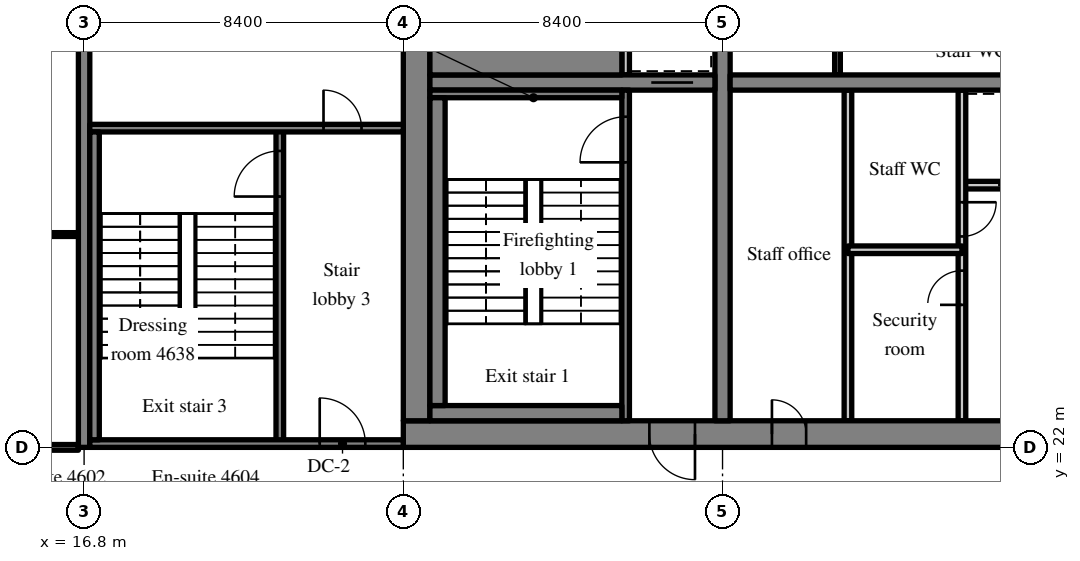
"""IFC4 building model, lengths in metres.
Left out: names, types, materials, properties, quantities, classifications, styles, units other than length and angle.
Written with IfcOpenShell. Run it as: python <this file> out.ifc"""

import sys

from ifc_helpers import new_model, si_unit, direction, frame, frame_2d, origin, place, context, subcontext, project, spatial, rectangle, extrude, source, transform, mapped, element, fill, save


model = new_model("IFC4")
c1 = context("Model", 3, precision=1e-05, world=origin(), true_north=direction((0.0, 1.0)))
c2 = subcontext(c1, "Body", "Model", "MODEL_VIEW")
j1 = project(units=[si_unit("LENGTHUNIT", "METRE"), si_unit("PLANEANGLEUNIT", "RADIAN")], contexts=[c1])
p1 = place(None, origin())
s1 = spatial("IfcSite", under=j1, at=p1, CompositionType="ELEMENT")
p2 = place(p1, origin())
s2 = spatial("IfcBuilding", under=s1, at=p2, CompositionType="ELEMENT")
p3 = place(p2, frame((0.0, 0.0, 189.6)))
s3 = spatial("IfcBuildingStorey", under=s2, at=p3, CompositionType="ELEMENT", Elevation=189.6)
m1 = source(origin(), c2, "Body", "SweptSolid", [
    extrude(rectangle(XDim=50.4, YDim=0.7, at=frame_2d((25.2, 0.0))), origin(), (0.0, 0.0, 1.0), 3.52),
])
p4 = place(p3, frame((25.2, 22.35, 0.0), z_axis=(0.0, 0.0, 1.0), x_axis=(1.0, 0.0, 0.0)))
e1 = element("IfcWall", 1, at=p4, inside=s3, PredefinedType="SHEAR", context=c2, shape_type="MappedRepresentation", body=[
    mapped(m1, transform((0.0, 0.0, 0.0), scale=1.0)),
])
m2 = source(origin(), c2, "Body", "SweptSolid", [
    extrude(rectangle(XDim=1.8, YDim=2.1, at=frame_2d((0.9, 1.05))), frame((0.0, 0.36, 0.0), z_axis=(0.0, -1.0, 0.0), x_axis=(1.0, 0.0, 0.0)), (0.0, 0.0, 1.0), 0.72),
])
p5 = place(p4, frame((15.9, 0.0, 0.0)))
e2 = element("IfcOpeningElement", 2, at=p5, cuts=e1, PredefinedType="OPENING", context=c2, shape_type="MappedRepresentation", body=[
    mapped(m2, transform((0.0, 0.0, 0.0), scale=1.0)),
])
m3 = source(origin(), c2, "Body", "SweptSolid", [
    extrude(rectangle(XDim=0.9, YDim=2.1, at=frame_2d((0.45, 1.05))), frame((0.0, 0.36, 0.0), z_axis=(0.0, -1.0, 0.0), x_axis=(1.0, 0.0, 0.0)), (0.0, 0.0, 1.0), 0.72),
])
p6 = place(p4, frame((9.7, 0.0, 0.0)))
e3 = element("IfcOpeningElement", 3, at=p6, cuts=e1, PredefinedType="OPENING", context=c2, shape_type="MappedRepresentation", body=[
    mapped(m3, transform((0.0, 0.0, 0.0), scale=1.0)),
])
p7 = place(p4, frame((21.5, 0.0, 0.0)))
e4 = element("IfcOpeningElement", 4, at=p7, cuts=e1, PredefinedType="OPENING", context=c2, shape_type="MappedRepresentation", body=[
    mapped(m3, transform((0.0, 0.0, 0.0), scale=1.0)),
])
p8 = place(p4, frame((32.7, 0.0, 0.0)))
e5 = element("IfcOpeningElement", 5, at=p8, cuts=e1, PredefinedType="OPENING", context=c2, shape_type="MappedRepresentation", body=[
    mapped(m2, transform((0.0, 0.0, 0.0), scale=1.0)),
])
m4 = source(origin(), c2, "Body", "SweptSolid", [
    extrude(rectangle(XDim=1.2, YDim=2.1, at=frame_2d((0.6, 1.05))), frame((0.0, 0.36, 0.0), z_axis=(0.0, -1.0, 0.0), x_axis=(1.0, 0.0, 0.0)), (0.0, 0.0, 1.0), 0.72),
])
p9 = place(p4, frame((6.475, 0.0, 0.0)))
e6 = element("IfcOpeningElement", 6, at=p9, cuts=e1, PredefinedType="OPENING", context=c2, shape_type="MappedRepresentation", body=[
    mapped(m4, transform((0.0, 0.0, 0.0), scale=1.0)),
])
p10 = place(p4, frame((47.875, 0.0, 0.0)))
e7 = element("IfcOpeningElement", 7, at=p10, cuts=e1, PredefinedType="OPENING", context=c2, shape_type="MappedRepresentation", body=[
    mapped(m4, transform((0.0, 0.0, 0.0), scale=1.0)),
])
m5 = source(origin(), c2, "Body", "SweptSolid", [
    extrude(rectangle(XDim=18.6, YDim=0.7, at=frame_2d((9.3, 0.0))), origin(), (0.0, 0.0, 1.0), 3.52),
])
p11 = place(p3, frame((25.55, 22.7, 0.0), z_axis=(0.0, 0.0, 1.0), x_axis=(0.0, 1.0, 0.0)))
e8 = element("IfcWall", 8, at=p11, inside=s3, PredefinedType="SHEAR", context=c2, shape_type="MappedRepresentation", body=[
    mapped(m5, transform((0.0, 0.0, 0.0), scale=1.0)),
])
m6 = source(origin(), c2, "Body", "SweptSolid", [
    extrude(rectangle(XDim=18.6, YDim=0.4, at=frame_2d((9.3, 0.0))), origin(), (0.0, 0.0, 1.0), 3.52),
])
p12 = place(p3, frame((33.6, 22.7, 0.0), z_axis=(0.0, 0.0, 1.0), x_axis=(0.0, 1.0, 0.0)))
e9 = element("IfcWall", 9, at=p12, inside=s3, PredefinedType="SHEAR", context=c2, shape_type="MappedRepresentation", body=[
    mapped(m6, transform((0.0, 0.0, 0.0), scale=1.0)),
])
m7 = source(origin(), c2, "Body", "SweptSolid", [
    extrude(rectangle(XDim=1.1, YDim=2.1, at=frame_2d((0.55, 1.05))), frame((0.0, 0.21, 0.0), z_axis=(0.0, -1.0, 0.0), x_axis=(1.0, 0.0, 0.0)), (0.0, 0.0, 1.0), 0.42),
])
p13 = place(p12, frame((12.75, 0.0, 0.0)))
e10 = element("IfcOpeningElement", 10, at=p13, cuts=e9, PredefinedType="OPENING", context=c2, shape_type="MappedRepresentation", body=[
    mapped(m7, transform((0.0, 0.0, 0.0), scale=1.0)),
])
m8 = source(origin(), c2, "Body", "SweptSolid", [
    extrude(rectangle(XDim=7.5, YDim=0.4, at=frame_2d((3.75, 0.0))), origin(), (0.0, 0.0, 1.0), 3.52),
])
p14 = place(p3, frame((25.9, 31.6, 0.0), z_axis=(0.0, 0.0, 1.0), x_axis=(1.0, 0.0, 0.0)))
e11 = element("IfcWall", 11, at=p14, inside=s3, PredefinedType="SHEAR", context=c2, shape_type="MappedRepresentation", body=[
    mapped(m8, transform((0.0, 0.0, 0.0), scale=1.0)),
])
p15 = place(p14, frame((5.825, 0.0, 0.0)))
e12 = element("IfcOpeningElement", 12, at=p15, cuts=e11, PredefinedType="OPENING", context=c2, shape_type="MappedRepresentation", body=[
    mapped(m7, transform((0.0, 0.0, 0.0), scale=1.0)),
])
m9 = source(origin(), c2, "Body", "SweptSolid", [
    extrude(rectangle(XDim=16.4, YDim=0.4, at=frame_2d((8.2, 0.0))), origin(), (0.0, 0.0, 1.0), 3.52),
])
p16 = place(p3, frame((33.8, 31.6, 0.0), z_axis=(0.0, 0.0, 1.0), x_axis=(1.0, 0.0, 0.0)))
e13 = element("IfcWall", 13, at=p16, inside=s3, PredefinedType="SHEAR", context=c2, shape_type="MappedRepresentation", body=[
    mapped(m9, transform((0.0, 0.0, 0.0), scale=1.0)),
])
m10 = source(origin(), c2, "Body", "SweptSolid", [
    extrude(rectangle(XDim=1.0, YDim=2.1, at=frame_2d((0.5, 1.05))), frame((0.0, 0.21, 0.0), z_axis=(0.0, -1.0, 0.0), x_axis=(1.0, 0.0, 0.0)), (0.0, 0.0, 1.0), 0.42),
])
p17 = place(p16, frame((14.8, 0.0, 0.0)))
e14 = element("IfcOpeningElement", 14, at=p17, cuts=e13, PredefinedType="OPENING", context=c2, shape_type="MappedRepresentation", body=[
    mapped(m10, transform((0.0, 0.0, 0.0), scale=1.0)),
])
m11 = source(origin(), c2, "Body", "SweptSolid", [
    extrude(rectangle(XDim=20.0, YDim=0.3, at=frame_2d((10.0, 0.0))), origin(), (0.0, 0.0, 1.0), 3.52),
])
p18 = place(p3, frame((16.8, 22.0, 0.0), z_axis=(0.0, 0.0, 1.0), x_axis=(0.0, 1.0, 0.0)))
e15 = element("IfcWall", 15, at=p18, inside=s3, PredefinedType="SHEAR", context=c2, shape_type="MappedRepresentation", body=[
    mapped(m11, transform((0.0, 0.0, 0.0), scale=1.0)),
])
m12 = source(origin(), c2, "Body", "SweptSolid", [
    extrude(rectangle(XDim=6.0, YDim=0.2, at=frame_2d((3.0, 0.0))), origin(), (0.0, 0.0, 1.0), 3.52),
])
p19 = place(p3, frame((39.9, 28.9, 0.0), z_axis=(0.0, 0.0, 1.0), x_axis=(1.0, 0.0, 0.0)))
e16 = element("IfcWall", 16, at=p19, inside=s3, PredefinedType="SOLIDWALL", context=c2, shape_type="MappedRepresentation", body=[
    mapped(m12, transform((0.0, 0.0, 0.0), scale=1.0)),
])
m13 = source(origin(), c2, "Body", "SweptSolid", [
    extrude(rectangle(XDim=1.1, YDim=2.1, at=frame_2d((0.55, 1.05))), frame((0.0, 0.11, 0.0), z_axis=(0.0, -1.0, 0.0), x_axis=(1.0, 0.0, 0.0)), (0.0, 0.0, 1.0), 0.22),
])
p20 = place(p19, frame((0.95, 0.0, 0.0)))
e17 = element("IfcOpeningElement", 17, at=p20, cuts=e16, PredefinedType="OPENING", context=c2, shape_type="MappedRepresentation", body=[
    mapped(m13, transform((0.0, 0.0, 0.0), scale=1.0)),
])
p21 = place(p19, frame((3.95, 0.0, 0.0)))
e18 = element("IfcOpeningElement", 18, at=p21, cuts=e16, PredefinedType="OPENING", context=c2, shape_type="MappedRepresentation", body=[
    mapped(m13, transform((0.0, 0.0, 0.0), scale=1.0)),
])
m14 = source(origin(), c2, "Body", "SweptSolid", [
    extrude(rectangle(XDim=8.7, YDim=0.2, at=frame_2d((4.35, 0.0))), origin(), (0.0, 0.0, 1.0), 3.52),
])
p22 = place(p3, frame((39.9, 22.7, 0.0), z_axis=(0.0, 0.0, 1.0), x_axis=(0.0, 1.0, 0.0)))
e19 = element("IfcWall", 19, at=p22, inside=s3, PredefinedType="PARTITIONING", context=c2, shape_type="MappedRepresentation", body=[
    mapped(m14, transform((0.0, 0.0, 0.0), scale=1.0)),
])
m15 = source(origin(), c2, "Body", "SweptSolid", [
    extrude(rectangle(XDim=0.9, YDim=2.1, at=frame_2d((0.45, 1.05))), frame((0.0, 0.11, 0.0), z_axis=(0.0, -1.0, 0.0), x_axis=(1.0, 0.0, 0.0)), (0.0, 0.0, 1.0), 0.22),
])
p23 = place(p22, frame((3.05, 0.0, 0.0)))
e20 = element("IfcOpeningElement", 20, at=p23, cuts=e19, PredefinedType="OPENING", context=c2, shape_type="MappedRepresentation", body=[
    mapped(m15, transform((0.0, 0.0, 0.0), scale=1.0)),
])
p24 = place(p22, frame((4.85, 0.0, 0.0)))
e21 = element("IfcOpeningElement", 21, at=p24, cuts=e19, PredefinedType="OPENING", context=c2, shape_type="MappedRepresentation", body=[
    mapped(m15, transform((0.0, 0.0, 0.0), scale=1.0)),
])
p25 = place(p3, frame((36.9, 22.7, 0.0), z_axis=(0.0, 0.0, 1.0), x_axis=(0.0, 1.0, 0.0)))
e22 = element("IfcWall", 22, at=p25, inside=s3, PredefinedType="PARTITIONING", context=c2, shape_type="MappedRepresentation", body=[
    mapped(m14, transform((0.0, 0.0, 0.0), scale=1.0)),
])
m16 = source(origin(), c2, "Body", "SweptSolid", [
    extrude(rectangle(XDim=3.0, YDim=0.2, at=frame_2d((1.5, 0.0))), origin(), (0.0, 0.0, 1.0), 3.52),
])
p26 = place(p3, frame((36.9, 27.2, 0.0), z_axis=(0.0, 0.0, 1.0), x_axis=(1.0, 0.0, 0.0)))
e23 = element("IfcWall", 23, at=p26, inside=s3, PredefinedType="PARTITIONING", context=c2, shape_type="MappedRepresentation", body=[
    mapped(m16, transform((0.0, 0.0, 0.0), scale=1.0)),
])
m17 = source(origin(), c2, "Body", "SweptSolid", [
    extrude(rectangle(XDim=3.2, YDim=0.15, at=frame_2d((1.6, 0.0))), origin(), (0.0, 0.0, 1.0), 3.52),
])
p27 = place(p3, frame((36.625, 31.8, 0.0), z_axis=(0.0, 0.0, 1.0), x_axis=(0.0, 1.0, 0.0)))
e24 = element("IfcWall", 24, at=p27, inside=s3, PredefinedType="PARTITIONING", context=c2, shape_type="MappedRepresentation", body=[
    mapped(m17, transform((0.0, 0.0, 0.0), scale=1.0)),
])
m18 = source(origin(), c2, "Body", "SweptSolid", [
    extrude(rectangle(XDim=8.7, YDim=0.2, at=frame_2d((4.35, 0.0))), origin(), (0.0, 0.0, 1.0), 3.52),
])
p28 = place(p3, frame((31.05, 22.7, 0.0), z_axis=(0.0, 0.0, 1.0), x_axis=(0.0, 1.0, 0.0)))
e25 = element("IfcWall", 25, at=p28, inside=s3, PredefinedType="SOLIDWALL", context=c2, shape_type="MappedRepresentation", body=[
    mapped(m18, transform((0.0, 0.0, 0.0), scale=1.0)),
])
m19 = source(origin(), c2, "Body", "SweptSolid", [
    extrude(rectangle(XDim=1.2, YDim=2.1, at=frame_2d((0.6, 1.05))), frame((0.0, 0.11, 0.0), z_axis=(0.0, -1.0, 0.0), x_axis=(1.0, 0.0, 0.0)), (0.0, 0.0, 1.0), 0.22),
])
p29 = place(p28, frame((6.8, 0.0, 0.0)))
e26 = element("IfcOpeningElement", 26, at=p29, cuts=e25, PredefinedType="OPENING", context=c2, shape_type="MappedRepresentation", body=[
    mapped(m19, transform((0.0, 0.0, 0.0), scale=1.0)),
])
m20 = source(origin(), c2, "Body", "SweptSolid", [
    extrude(rectangle(XDim=1.8, YDim=0.2, at=frame_2d((0.9, 0.0))), origin(), (0.0, 0.0, 1.0), 3.52),
])
p30 = place(p3, frame((31.05, 31.8, 0.0), z_axis=(0.0, 0.0, 1.0), x_axis=(0.0, 1.0, 0.0)))
e27 = element("IfcWall", 27, at=p30, inside=s3, PredefinedType="SOLIDWALL", context=c2, shape_type="MappedRepresentation", body=[
    mapped(m20, transform((0.0, 0.0, 0.0), scale=1.0)),
])
m21 = source(origin(), c2, "Body", "SweptSolid", [
    extrude(rectangle(XDim=8.3, YDim=0.2, at=frame_2d((4.15, 0.0))), origin(), (0.0, 0.0, 1.0), 3.52),
])
p31 = place(p3, frame((21.95, 22.1, 0.0), z_axis=(0.0, 0.0, 1.0), x_axis=(0.0, 1.0, 0.0)))
e28 = element("IfcWall", 28, at=p31, inside=s3, PredefinedType="SOLIDWALL", context=c2, shape_type="MappedRepresentation", body=[
    mapped(m21, transform((0.0, 0.0, 0.0), scale=1.0)),
])
p32 = place(p31, frame((6.5, 0.0, 0.0)))
e29 = element("IfcOpeningElement", 29, at=p32, cuts=e28, PredefinedType="OPENING", context=c2, shape_type="MappedRepresentation", body=[
    mapped(m19, transform((0.0, 0.0, 0.0), scale=1.0)),
])
m22 = source(origin(), c2, "Body", "SweptSolid", [
    extrude(rectangle(XDim=8.25, YDim=0.2, at=frame_2d((4.125, 0.0))), origin(), (0.0, 0.0, 1.0), 3.52),
])
p33 = place(p3, frame((16.95, 22.1, 0.0), z_axis=(0.0, 0.0, 1.0), x_axis=(1.0, 0.0, 0.0)))
e30 = element("IfcWall", 30, at=p33, inside=s3, PredefinedType="SOLIDWALL", context=c2, shape_type="MappedRepresentation", body=[
    mapped(m22, transform((0.0, 0.0, 0.0), scale=1.0)),
])
p34 = place(p33, frame((6.05, 0.0, 0.0)))
e31 = element("IfcOpeningElement", 31, at=p34, cuts=e30, PredefinedType="OPENING", context=c2, shape_type="MappedRepresentation", body=[
    mapped(m19, transform((0.0, 0.0, 0.0), scale=1.0)),
])
p35 = place(p3, frame((16.95, 30.4, 0.0), z_axis=(0.0, 0.0, 1.0), x_axis=(1.0, 0.0, 0.0)))
e32 = element("IfcWall", 32, at=p35, inside=s3, PredefinedType="SOLIDWALL", context=c2, shape_type="MappedRepresentation", body=[
    mapped(m22, transform((0.0, 0.0, 0.0), scale=1.0)),
])
m23 = source(origin(), c2, "Body", "SweptSolid", [
    extrude(rectangle(XDim=1.0, YDim=2.1, at=frame_2d((0.5, 1.05))), frame((0.0, 0.11, 0.0), z_axis=(0.0, -1.0, 0.0), x_axis=(1.0, 0.0, 0.0)), (0.0, 0.0, 1.0), 0.22),
])
p36 = place(p35, frame((6.15, 0.0, 0.0)))
e33 = element("IfcOpeningElement", 33, at=p36, cuts=e32, PredefinedType="OPENING", context=c2, shape_type="MappedRepresentation", body=[
    mapped(m23, transform((0.0, 0.0, 0.0), scale=1.0)),
])
m24 = source(origin(), c2, "Body", "SweptSolid", [
    extrude(rectangle(XDim=5.05, YDim=0.4, at=frame_2d((2.525, 0.0))), origin(), (0.0, 0.0, 1.0), 3.52),
])
p37 = place(p3, frame((25.9, 22.9, 0.0), z_axis=(0.0, 0.0, 1.0), x_axis=(1.0, 0.0, 0.0)))
e34 = element("IfcWall", 34, at=p37, inside=s3, PredefinedType="SOLIDWALL", context=c2, shape_type="MappedRepresentation", body=[
    mapped(m24, transform((0.0, 0.0, 0.0), scale=1.0)),
])
m25 = source(origin(), c2, "Body", "SweptSolid", [
    extrude(rectangle(XDim=5.05, YDim=0.2, at=frame_2d((2.525, 0.0))), origin(), (0.0, 0.0, 1.0), 3.52),
])
p38 = place(p3, frame((25.9, 31.3, 0.0), z_axis=(0.0, 0.0, 1.0), x_axis=(1.0, 0.0, 0.0)))
e35 = element("IfcWall", 35, at=p38, inside=s3, PredefinedType="SOLIDWALL", context=c2, shape_type="MappedRepresentation", body=[
    mapped(m25, transform((0.0, 0.0, 0.0), scale=1.0)),
])
m26 = source(origin(), c2, "Body", "SweptSolid", [
    extrude(rectangle(XDim=8.1, YDim=0.4, at=frame_2d((4.05, 0.0))), origin(), (0.0, 0.0, 1.0), 3.52),
])
p39 = place(p3, frame((26.1, 23.1, 0.0), z_axis=(0.0, 0.0, 1.0), x_axis=(0.0, 1.0, 0.0)))
e36 = element("IfcWall", 36, at=p39, inside=s3, PredefinedType="SOLIDWALL", context=c2, shape_type="MappedRepresentation", body=[
    mapped(m26, transform((0.0, 0.0, 0.0), scale=1.0)),
])
m27 = source(origin(), c2, "Body", "SweptSolid", [
    extrude(rectangle(XDim=8.1, YDim=0.25, at=frame_2d((4.05, 0.0))), origin(), (0.0, 0.0, 1.0), 3.52),
])
p40 = place(p3, frame((17.075, 22.2, 0.0), z_axis=(0.0, 0.0, 1.0), x_axis=(0.0, 1.0, 0.0)))
e37 = element("IfcWall", 37, at=p40, inside=s3, PredefinedType="SOLIDWALL", context=c2, shape_type="MappedRepresentation", body=[
    mapped(m27, transform((0.0, 0.0, 0.0), scale=1.0)),
])
m28 = source(origin(), c2, "Body", "SweptSolid", [
    extrude(rectangle(XDim=5.05, YDim=1.0, at=frame_2d((2.525, 0.0))), origin(), (0.0, 0.0, 1.0), 3.52),
])
p41 = place(p3, frame((25.9, 32.3, 0.0), z_axis=(0.0, 0.0, 1.0), x_axis=(1.0, 0.0, 0.0)))
e38 = element("IfcWall", 38, at=p41, inside=s3, PredefinedType="SOLIDWALL", context=c2, shape_type="MappedRepresentation", body=[
    mapped(m28, transform((0.0, 0.0, 0.0), scale=1.0)),
])
m29 = source(origin(), c2, "Body", "SweptSolid", [
    extrude(rectangle(XDim=2.5, YDim=0.1, at=frame_2d((1.25, 0.0))), origin(), (0.0, 0.0, 1.0), 3.52),
])
p42 = place(p3, frame((14.15, 27.6, 0.0), z_axis=(0.0, 0.0, 1.0), x_axis=(1.0, 0.0, 0.0)))
e39 = element("IfcWall", 39, at=p42, inside=s3, PredefinedType="PARTITIONING", context=c2, shape_type="MappedRepresentation", body=[
    mapped(m29, transform((0.0, 0.0, 0.0), scale=1.0)),
])
m30 = source(origin(), c2, "Body", "SweptSolid", [
    extrude(rectangle(XDim=0.9, YDim=2.1, at=frame_2d((0.45, 1.05))), frame((0.0, 0.06, 0.0), z_axis=(0.0, -1.0, 0.0), x_axis=(1.0, 0.0, 0.0)), (0.0, 0.0, 1.0), 0.12),
])
p43 = place(p42, frame((0.8, 0.0, 0.0)))
e40 = element("IfcOpeningElement", 40, at=p43, cuts=e39, PredefinedType="OPENING", context=c2, shape_type="MappedRepresentation", body=[
    mapped(m30, transform((0.0, 0.0, 0.0), scale=1.0)),
])
m31 = source(origin(), c2, "Body", "SweptSolid", [
    extrude(rectangle(XDim=7.95, YDim=0.15, at=frame_2d((3.975, 0.0))), origin(), (0.0, 0.0, 1.0), 2.82),
])
p44 = place(p3, frame((8.7, 22.0, 0.0), z_axis=(0.0, 0.0, 1.0), x_axis=(1.0, 0.0, 0.0)))
e41 = element("IfcWall", 41, at=p44, inside=s3, PredefinedType="PARTITIONING", context=c2, shape_type="MappedRepresentation", body=[
    mapped(m31, transform((0.0, 0.0, 0.0), scale=1.0)),
])
m32 = source(origin(), c2, "Body", "SweptSolid", [
    extrude(rectangle(XDim=1.0, YDim=2.1, at=frame_2d((0.5, 1.05))), frame((0.0, 0.085, 0.0), z_axis=(0.0, -1.0, 0.0), x_axis=(1.0, 0.0, 0.0)), (0.0, 0.0, 1.0), 0.17),
])
p45 = place(p44, frame((0.4, 0.0, 0.0)))
e42 = element("IfcOpeningElement", 42, at=p45, cuts=e41, PredefinedType="OPENING", context=c2, shape_type="MappedRepresentation", body=[
    mapped(m32, transform((0.0, 0.0, 0.0), scale=1.0)),
])
m33 = source(origin(), c2, "Body", "SweptSolid", [
    extrude(rectangle(XDim=1.1, YDim=2.1, at=frame_2d((0.55, 1.05))), frame((0.0, 0.025, 0.0), z_axis=(0.0, -1.0, 0.0), x_axis=(1.0, 0.0, 0.0)), (0.0, 0.0, 1.0), 0.05),
])
p46 = place(p20, origin())
e43 = element("IfcDoor", 43, at=p46, inside=s3, OperationType="SLIDING_TO_LEFT", PredefinedType="DOOR", context=c2, shape_type="MappedRepresentation", body=[
    mapped(m33, transform((0.0, 0.0, 0.0), scale=1.0)),
])
fill(e17, e43)
m34 = source(origin(), c2, "Body", "SweptSolid", [
    extrude(rectangle(XDim=0.9, YDim=2.1, at=frame_2d((0.45, 1.05))), frame((0.0, 0.275, 0.0), z_axis=(0.0, -1.0, 0.0), x_axis=(1.0, 0.0, 0.0)), (0.0, 0.0, 1.0), 0.05),
])
p47 = place(p6, origin())
e44 = element("IfcDoor", 44, at=p47, inside=s3, OperationType="SINGLE_SWING_LEFT", PredefinedType="DOOR", context=c2, shape_type="MappedRepresentation", body=[
    mapped(m34, transform((0.0, 0.0, 0.0), scale=1.0)),
])
fill(e3, e44)
m35 = source(origin(), c2, "Body", "SweptSolid", [
    extrude(rectangle(XDim=0.9, YDim=2.1, at=frame_2d((0.45, 1.05))), frame((0.0, 0.025, 0.0), z_axis=(0.0, -1.0, 0.0), x_axis=(1.0, 0.0, 0.0)), (0.0, 0.0, 1.0), 0.05),
])
p48 = place(p23, origin())
e45 = element("IfcDoor", 45, at=p48, inside=s3, OperationType="SINGLE_SWING_LEFT", PredefinedType="DOOR", context=c2, shape_type="MappedRepresentation", body=[
    mapped(m35, transform((0.0, 0.0, 0.0), scale=1.0)),
])
fill(e20, e45)
p49 = place(p24, origin())
e46 = element("IfcDoor", 46, at=p49, inside=s3, OperationType="SINGLE_SWING_RIGHT", PredefinedType="DOOR", context=c2, shape_type="MappedRepresentation", body=[
    mapped(m35, transform((0.0, 0.0, 0.0), scale=1.0)),
])
fill(e21, e46)
m36 = source(origin(), c2, "Body", "SweptSolid", [
    extrude(rectangle(XDim=1.2, YDim=2.1, at=frame_2d((0.6, 1.05))), frame((0.0, 0.025, 0.0), z_axis=(0.0, -1.0, 0.0), x_axis=(1.0, 0.0, 0.0)), (0.0, 0.0, 1.0), 0.05),
])
p50 = place(p29, origin())
e47 = element("IfcDoor", 47, at=p50, inside=s3, OperationType="SINGLE_SWING_LEFT", PredefinedType="DOOR", context=c2, shape_type="MappedRepresentation", body=[
    mapped(m36, transform((0.0, 0.0, 0.0), scale=1.0)),
])
fill(e26, e47)
m37 = source(origin(), c2, "Body", "SweptSolid", [
    extrude(rectangle(XDim=1.2, YDim=2.1, at=frame_2d((0.6, 1.05))), frame((0.0, 0.275, 0.0), z_axis=(0.0, -1.0, 0.0), x_axis=(1.0, 0.0, 0.0)), (0.0, 0.0, 1.0), 0.05),
])
p51 = place(p9, origin())
e48 = element("IfcDoor", 48, at=p51, inside=s3, OperationType="SINGLE_SWING_RIGHT", PredefinedType="DOOR", context=c2, shape_type="MappedRepresentation", body=[
    mapped(m37, transform((0.0, 0.0, 0.0), scale=1.0)),
])
fill(e6, e48)
p52 = place(p15, origin())
e49 = element("IfcDoor", 49, at=p52, inside=s3, OperationType="SLIDING_TO_RIGHT", PredefinedType="DOOR", context=c2, shape_type="MappedRepresentation", body=[
    mapped(m33, transform((0.0, 0.0, 0.0), scale=1.0)),
])
fill(e12, e49)
p53 = place(p32, origin())
e50 = element("IfcDoor", 50, at=p53, inside=s3, OperationType="SINGLE_SWING_LEFT", PredefinedType="DOOR", context=c2, shape_type="MappedRepresentation", body=[
    mapped(m36, transform((0.0, 0.0, 0.0), scale=1.0)),
])
fill(e29, e50)
p54 = place(p34, origin())
e51 = element("IfcDoor", 51, at=p54, inside=s3, OperationType="SINGLE_SWING_LEFT", PredefinedType="DOOR", context=c2, shape_type="MappedRepresentation", body=[
    mapped(m36, transform((0.0, 0.0, 0.0), scale=1.0)),
])
fill(e31, e51)
m38 = source(origin(), c2, "Body", "SweptSolid", [
    extrude(rectangle(XDim=1.0, YDim=2.1, at=frame_2d((0.5, 1.05))), frame((0.0, 0.025, 0.0), z_axis=(0.0, -1.0, 0.0), x_axis=(1.0, 0.0, 0.0)), (0.0, 0.0, 1.0), 0.05),
])
p55 = place(p36, origin())
e52 = element("IfcDoor", 52, at=p55, inside=s3, OperationType="SINGLE_SWING_LEFT", PredefinedType="DOOR", context=c2, shape_type="MappedRepresentation", body=[
    mapped(m38, transform((0.0, 0.0, 0.0), scale=1.0)),
])
fill(e33, e52)
save(model, sys.argv[1])
